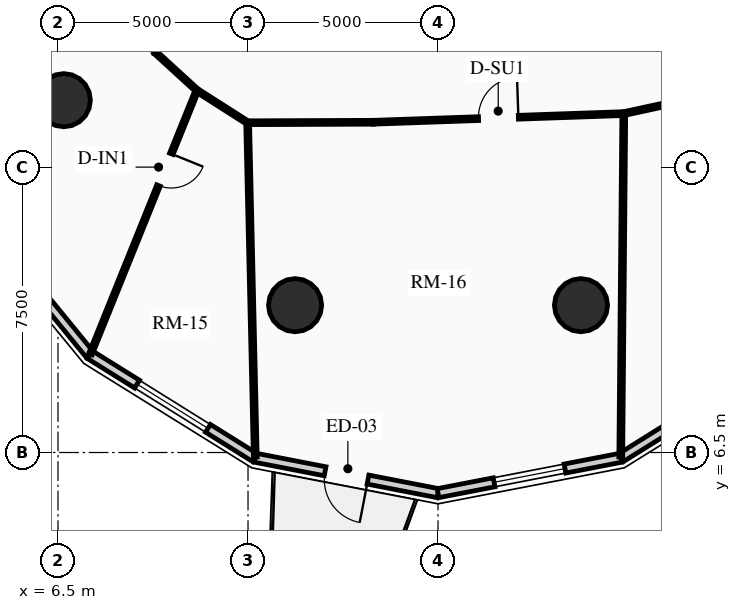
"""IFC4 building model, lengths in metres.
Left out: names, types, materials, properties, quantities, classifications, styles, units other than length and angle.
Written with IfcOpenShell. Run it as: python <this file> out.ifc"""

import sys

from ifc_helpers import new_model, si_unit, direction, frame, frame_2d, origin, origin_2d, place, context, subcontext, project, spatial, rectangle, circle, extrude, source, transform, mapped, element, fill, save


model = new_model("IFC4")
c1 = context("Model", 3, precision=1e-05, world=origin(), true_north=direction((0.0, 1.0)))
c2 = subcontext(c1, "Body", "Model", "MODEL_VIEW")
j1 = project(units=[si_unit("LENGTHUNIT", "METRE"), si_unit("PLANEANGLEUNIT", "RADIAN")], contexts=[c1])
p1 = place(None, origin())
s1 = spatial("IfcSite", under=j1, at=p1, CompositionType="ELEMENT")
p2 = place(p1, origin())
s2 = spatial("IfcBuilding", under=s1, at=p2, CompositionType="ELEMENT")
p3 = place(p2, frame((0.0, 0.0, 102.16)))
s3 = spatial("IfcBuildingStorey", under=s2, at=p3, CompositionType="ELEMENT", Elevation=102.16)
for number, where, z_axis, x_axis in (
    (1, (6.653, 15.771, 0.0), (0.0, 0.0, 1.0), (1.0, 0.0, 0.0)),
    (2, (12.739, 10.377, 0.0), (0.0, 0.0, 1.0), (1.0, 0.0, 0.0)),
    (3, (20.261, 10.377, 0.0), (0.0, 0.0, 1.0), (1.0, 0.0, 0.0)),
):
    element("IfcColumn", number, at=place(p3, frame(where, z_axis=z_axis, x_axis=x_axis)), inside=s3, PredefinedType="USERDEFINED", context=c2, shape_type="SweptSolid", body=[
        extrude(circle(Radius=0.7, at=origin_2d()), origin(), (0.0, 0.0, 1.0), 2.91),
    ])
p4 = place(p3, frame((7.342, 9.072, 0.0), z_axis=(0.0, 0.0, 1.0), x_axis=(-0.632700781152, 0.77439635945, 0.0)))
e4 = element("IfcWall", 4, at=p4, inside=s3, PredefinedType="SOLIDWALL", context=c2, shape_type="SweptSolid", body=[
    extrude(rectangle(XDim=5.448, YDim=0.24, at=frame_2d((2.724, 0.0))), origin(), (0.0, 0.0, 1.0), 2.179),
])
p5 = place(p3, frame((11.685, 6.363, 0.0), z_axis=(0.0, 0.0, 1.0), x_axis=(-0.848520380187, 0.529162701263, 0.0)))
e5 = element("IfcWall", 5, at=p5, inside=s3, PredefinedType="SOLIDWALL", context=c2, shape_type="SweptSolid", body=[
    extrude(rectangle(XDim=5.119, YDim=0.24, at=frame_2d((2.56, 0.0))), origin(), (0.0, 0.0, 1.0), 2.179),
])
m1 = source(origin(), c2, "Body", "SweptSolid", [
    extrude(rectangle(XDim=2.2, YDim=1.35, at=frame_2d((1.1, 0.675))), frame((0.0, 0.13, 0.0), z_axis=(0.0, -1.0, 0.0), x_axis=(1.0, 0.0, 0.0)), (0.0, 0.0, 1.0), 0.26),
])
p6 = place(p5, frame((1.459, 0.0, 0.65)))
e6 = element("IfcOpeningElement", 6, at=p6, cuts=e5, PredefinedType="OPENING", context=c2, shape_type="MappedRepresentation", body=[
    mapped(m1, transform((0.0, 0.0, 0.0), x_axis=(1.0, 0.0, 0.0), y_axis=(0.0, 1.0, 0.0), z_axis=(0.0, 0.0, 1.0), scale=1.0)),
])
p7 = place(p3, frame((16.5, 5.43, 0.0), z_axis=(0.0, 0.0, 1.0), x_axis=(-0.981723785992, 0.190311344954, 0.0)))
e7 = element("IfcWall", 7, at=p7, inside=s3, PredefinedType="SOLIDWALL", context=c2, shape_type="SweptSolid", body=[
    extrude(rectangle(XDim=4.904, YDim=0.24, at=frame_2d((2.452, 0.0))), origin(), (0.0, 0.0, 1.0), 2.179),
])
m2 = source(origin(), c2, "Body", "SweptSolid", [
    extrude(rectangle(XDim=1.15, YDim=2.005, at=frame_2d((0.575, 1.002))), frame((0.0, 0.13, 0.0), z_axis=(0.0, -1.0, 0.0), x_axis=(1.0, 0.0, 0.0)), (0.0, 0.0, 1.0), 0.26),
])
p8 = place(p7, frame((1.877, 0.0, 0.0)))
e8 = element("IfcOpeningElement", 8, at=p8, cuts=e7, PredefinedType="OPENING", context=c2, shape_type="MappedRepresentation", body=[
    mapped(m2, transform((0.0, 0.0, 0.0), x_axis=(1.0, 0.0, 0.0), y_axis=(0.0, 1.0, 0.0), z_axis=(0.0, 0.0, 1.0), scale=1.0)),
])
p9 = place(p3, frame((21.315, 6.363, 0.0), z_axis=(0.0, 0.0, 1.0), x_axis=(-0.981723785992, -0.190311344954, 0.0)))
e9 = element("IfcWall", 9, at=p9, inside=s3, PredefinedType="SOLIDWALL", context=c2, shape_type="SweptSolid", body=[
    extrude(rectangle(XDim=4.904, YDim=0.24, at=frame_2d((2.452, 0.0))), origin(), (0.0, 0.0, 1.0), 2.179),
])
m3 = source(origin(), c2, "Body", "SweptSolid", [
    extrude(rectangle(XDim=1.9, YDim=1.35, at=frame_2d((0.95, 0.675))), frame((0.0, 0.13, 0.0), z_axis=(0.0, -1.0, 0.0), x_axis=(1.0, 0.0, 0.0)), (0.0, 0.0, 1.0), 0.26),
])
p10 = place(p9, frame((1.502, 0.0, 0.65)))
e10 = element("IfcOpeningElement", 10, at=p10, cuts=e9, PredefinedType="OPENING", context=c2, shape_type="MappedRepresentation", body=[
    mapped(m3, transform((0.0, 0.0, 0.0), x_axis=(1.0, 0.0, 0.0), y_axis=(0.0, 1.0, 0.0), z_axis=(0.0, 0.0, 1.0), scale=1.0)),
])
p11 = place(p3, frame((25.658, 9.072, 0.0), z_axis=(0.0, 0.0, 1.0), x_axis=(-0.848520380187, -0.529162701263, 0.0)))
e11 = element("IfcWall", 11, at=p11, inside=s3, PredefinedType="SOLIDWALL", context=c2, shape_type="SweptSolid", body=[
    extrude(rectangle(XDim=5.119, YDim=0.24, at=frame_2d((2.56, 0.0))), origin(), (0.0, 0.0, 1.0), 2.179),
])
p12 = place(p3, frame((8.587, 18.371, 0.0), z_axis=(0.0, 0.0, 1.0), x_axis=(0.331494289155, -0.943457225452, 0.0)))
e12 = element("IfcWall", 12, at=p12, inside=s3, PredefinedType="MOVABLE", context=c2, shape_type="SweptSolid", body=[
    extrude(rectangle(XDim=1.416, YDim=0.1, at=frame_2d((0.708, 0.0))), origin(), (0.0, 0.0, 1.0), 2.225),
])
p13 = place(p3, frame((9.057, 17.034, 0.0), z_axis=(0.0, 0.0, 1.0), x_axis=(0.737874877538, -0.674937526811, 0.0)))
e13 = element("IfcWall", 13, at=p13, inside=s3, PredefinedType="MOVABLE", context=c2, shape_type="SweptSolid", body=[
    extrude(rectangle(XDim=1.49, YDim=0.1, at=frame_2d((0.745, 0.0))), origin(), (0.0, 0.0, 1.0), 2.225),
])
p14 = place(p3, frame((10.156, 16.029, 0.0), z_axis=(0.0, 0.0, 1.0), x_axis=(0.843127549493, -0.537713618282, 0.0)))
e14 = element("IfcWall", 14, at=p14, inside=s3, PredefinedType="MOVABLE", context=c2, shape_type="SweptSolid", body=[
    extrude(rectangle(XDim=1.583, YDim=0.1, at=frame_2d((0.792, 0.0))), origin(), (0.0, 0.0, 1.0), 2.225),
])
p15 = place(p3, frame((11.49, 15.178, 0.0), z_axis=(0.0, 0.0, 1.0), x_axis=(0.99999260582, 0.003845556538, 0.0)))
e15 = element("IfcWall", 15, at=p15, inside=s3, PredefinedType="MOVABLE", context=c2, shape_type="SweptSolid", body=[
    extrude(rectangle(XDim=3.301, YDim=0.1, at=frame_2d((1.651, 0.0))), origin(), (0.0, 0.0, 1.0), 2.225),
])
p16 = place(p3, frame((14.792, 15.191, 0.0), z_axis=(0.0, 0.0, 1.0), x_axis=(0.999405559957, 0.034475015985, 0.0)))
e16 = element("IfcWall", 16, at=p16, inside=s3, PredefinedType="MOVABLE", context=c2, shape_type="SweptSolid", body=[
    extrude(rectangle(XDim=6.6, YDim=0.1, at=frame_2d((3.3, 0.0))), origin(), (0.0, 0.0, 1.0), 2.225),
])
m4 = source(origin(), c2, "Body", "SweptSolid", [
    extrude(rectangle(XDim=1.05, YDim=2.015, at=frame_2d((0.525, 1.007))), frame((0.0, 0.06, 0.0), z_axis=(0.0, -1.0, 0.0), x_axis=(1.0, 0.0, 0.0)), (0.0, 0.0, 1.0), 0.12),
])
p17 = place(p16, frame((2.775, 0.0, 0.0)))
e17 = element("IfcOpeningElement", 17, at=p17, cuts=e16, PredefinedType="OPENING", context=c2, shape_type="MappedRepresentation", body=[
    mapped(m4, transform((0.0, 0.0, 0.0), x_axis=(1.0, 0.0, 0.0), y_axis=(0.0, 1.0, 0.0), z_axis=(0.0, 0.0, 1.0), scale=1.0)),
])
p18 = place(p3, frame((21.388, 15.418, 0.0), z_axis=(0.0, 0.0, 1.0), x_axis=(0.977297113048, 0.211873435874, 0.0)))
e18 = element("IfcWall", 18, at=p18, inside=s3, PredefinedType="MOVABLE", context=c2, shape_type="SweptSolid", body=[
    extrude(rectangle(XDim=1.877, YDim=0.1, at=frame_2d((0.938, 0.0))), origin(), (0.0, 0.0, 1.0), 2.225),
])
p19 = place(p3, frame((11.49, 15.178, 0.0), z_axis=(0.0, 0.0, 1.0), x_axis=(0.022838019925, -0.999739178409, 0.0)))
e19 = element("IfcWall", 19, at=p19, inside=s3, PredefinedType="MOVABLE", context=c2, shape_type="SweptSolid", body=[
    extrude(rectangle(XDim=8.798, YDim=0.1, at=frame_2d((4.399, 0.0))), origin(), (0.0, 0.0, 1.0), 2.179),
])
p20 = place(p3, frame((21.388, 15.418, 0.0), z_axis=(0.0, 0.0, 1.0), x_axis=(-0.008780834631, -0.999961447728, 0.0)))
e20 = element("IfcWall", 20, at=p20, inside=s3, PredefinedType="MOVABLE", context=c2, shape_type="SweptSolid", body=[
    extrude(rectangle(XDim=9.036, YDim=0.1, at=frame_2d((4.518, 0.0))), origin(), (0.0, 0.0, 1.0), 2.179),
])
p21 = place(p3, frame((10.156, 16.029, 0.0), z_axis=(0.0, 0.0, 1.0), x_axis=(-0.374397256956, -0.9272684045, 0.0)))
e21 = element("IfcWall", 21, at=p21, inside=s3, PredefinedType="MOVABLE", context=c2, shape_type="SweptSolid", body=[
    extrude(rectangle(XDim=7.485, YDim=0.1, at=frame_2d((3.743, 0.0))), origin(), (0.0, 0.0, 1.0), 2.179),
])
m5 = source(origin(), c2, "Body", "SweptSolid", [
    extrude(rectangle(XDim=0.9, YDim=2.005, at=frame_2d((0.45, 1.002))), frame((0.0, 0.06, 0.0), z_axis=(0.0, -1.0, 0.0), x_axis=(1.0, 0.0, 0.0)), (0.0, 0.0, 1.0), 0.12),
])
p22 = place(p21, frame((1.8, 0.0, 0.0)))
e22 = element("IfcOpeningElement", 22, at=p22, cuts=e21, PredefinedType="OPENING", context=c2, shape_type="MappedRepresentation", body=[
    mapped(m5, transform((0.0, 0.0, 0.0), x_axis=(1.0, 0.0, 0.0), y_axis=(0.0, 1.0, 0.0), z_axis=(0.0, 0.0, 1.0), scale=1.0)),
])
m6 = source(origin(), c2, "Body", "SweptSolid", [
    extrude(rectangle(XDim=2.2, YDim=1.35, at=frame_2d((1.1, 0.675))), frame((0.0, 0.03, 0.0), z_axis=(0.0, -1.0, 0.0), x_axis=(1.0, 0.0, 0.0)), (0.0, 0.0, 1.0), 0.06),
])
p23 = place(p6, origin())
e23 = element("IfcWindow", 23, at=p23, inside=s3, PartitioningType="DOUBLE_PANEL_VERTICAL", PredefinedType="WINDOW", context=c2, shape_type="MappedRepresentation", body=[
    mapped(m6, transform((0.0, 0.0, 0.0), x_axis=(1.0, 0.0, 0.0), y_axis=(0.0, 1.0, 0.0), z_axis=(0.0, 0.0, 1.0), scale=1.0)),
])
fill(e6, e23)
m7 = source(origin(), c2, "Body", "SweptSolid", [
    extrude(rectangle(XDim=1.15, YDim=2.005, at=frame_2d((0.575, 1.002))), frame((0.0, 0.025, 0.0), z_axis=(0.0, -1.0, 0.0), x_axis=(1.0, 0.0, 0.0)), (0.0, 0.0, 1.0), 0.05),
])
p24 = place(p8, origin())
e24 = element("IfcDoor", 24, at=p24, inside=s3, OperationType="SINGLE_SWING_LEFT", PredefinedType="DOOR", context=c2, shape_type="MappedRepresentation", body=[
    mapped(m7, transform((0.0, 0.0, 0.0), x_axis=(1.0, 0.0, 0.0), y_axis=(0.0, 1.0, 0.0), z_axis=(0.0, 0.0, 1.0), scale=1.0)),
])
fill(e8, e24)
m8 = source(origin(), c2, "Body", "SweptSolid", [
    extrude(rectangle(XDim=1.9, YDim=1.35, at=frame_2d((0.95, 0.675))), frame((0.0, 0.03, 0.0), z_axis=(0.0, -1.0, 0.0), x_axis=(1.0, 0.0, 0.0)), (0.0, 0.0, 1.0), 0.06),
])
p25 = place(p10, origin())
e25 = element("IfcWindow", 25, at=p25, inside=s3, PartitioningType="DOUBLE_PANEL_VERTICAL", PredefinedType="WINDOW", context=c2, shape_type="MappedRepresentation", body=[
    mapped(m8, transform((0.0, 0.0, 0.0), x_axis=(1.0, 0.0, 0.0), y_axis=(0.0, 1.0, 0.0), z_axis=(0.0, 0.0, 1.0), scale=1.0)),
])
fill(e10, e25)
m9 = source(origin(), c2, "Body", "SweptSolid", [
    extrude(rectangle(XDim=0.9, YDim=2.005, at=frame_2d((0.45, 1.002))), frame((0.0, 0.025, 0.0), z_axis=(0.0, -1.0, 0.0), x_axis=(1.0, 0.0, 0.0)), (0.0, 0.0, 1.0), 0.05),
])
p26 = place(p22, origin())
e26 = element("IfcDoor", 26, at=p26, inside=s3, OperationType="SINGLE_SWING_LEFT", PredefinedType="DOOR", context=c2, shape_type="MappedRepresentation", body=[
    mapped(m9, transform((0.0, 0.0, 0.0), x_axis=(1.0, 0.0, 0.0), y_axis=(0.0, 1.0, 0.0), z_axis=(0.0, 0.0, 1.0), scale=1.0)),
])
fill(e22, e26)
m10 = source(origin(), c2, "Body", "SweptSolid", [
    extrude(rectangle(XDim=1.05, YDim=2.015, at=frame_2d((0.525, 1.007))), frame((0.0, 0.025, 0.0), z_axis=(0.0, -1.0, 0.0), x_axis=(1.0, 0.0, 0.0)), (0.0, 0.0, 1.0), 0.05),
])
p27 = place(p17, origin())
e27 = element("IfcDoor", 27, at=p27, inside=s3, OperationType="SINGLE_SWING_RIGHT", PredefinedType="DOOR", context=c2, shape_type="MappedRepresentation", body=[
    mapped(m10, transform((0.0, 0.0, 0.0), x_axis=(1.0, 0.0, 0.0), y_axis=(0.0, 1.0, 0.0), z_axis=(0.0, 0.0, 1.0), scale=1.0)),
])
fill(e17, e27)
save(model, sys.argv[1])
